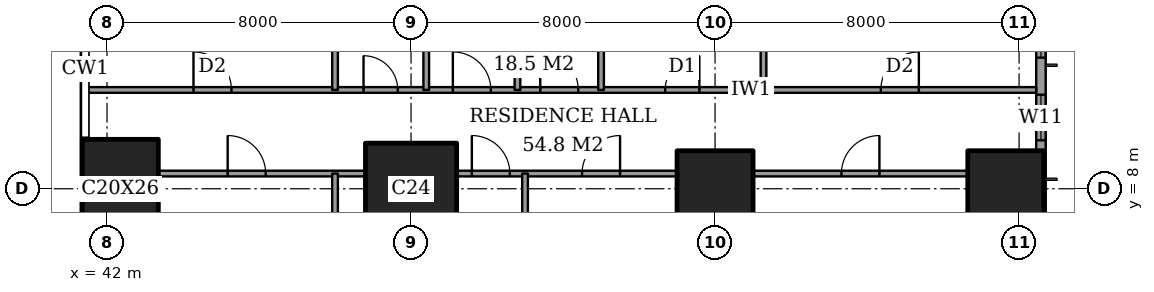
"""IFC4 building model, lengths in metres.
Left out: names, types, materials, properties, quantities, classifications, styles, units other than length and angle.
Written with IfcOpenShell. Run it as: python <this file> out.ifc"""

import sys

from ifc_helpers import new_model, si_unit, direction, frame, frame_2d, origin, origin_2d, place, context, subcontext, project, spatial, rectangle, extrude, element, fill, save


model = new_model("IFC4")
c1 = context("Model", 3, precision=1e-05, world=origin(), true_north=direction((0.0, 1.0)))
c2 = subcontext(c1, "Body", "Model", "MODEL_VIEW")
j1 = project(units=[si_unit("LENGTHUNIT", "METRE"), si_unit("PLANEANGLEUNIT", "RADIAN")], contexts=[c1])
p1 = place(None, origin())
s1 = spatial("IfcSite", under=j1, at=p1, CompositionType="ELEMENT")
p2 = place(p1, origin())
s2 = spatial("IfcBuilding", under=s1, at=p2, CompositionType="ELEMENT")
p3 = place(p2, frame((0.0, 0.0, 143.0)))
s3 = spatial("IfcBuildingStorey", under=s2, at=p3, CompositionType="ELEMENT", Elevation=143.0)
p4 = place(p3, frame((42.35, 8.0, 0.0), z_axis=(0.0, 0.0, 1.0), x_axis=(1.0, 0.0, 0.0)))
e1 = element("IfcColumn", 1, at=p4, inside=s3, PredefinedType="COLUMN", context=c2, shape_type="SweptSolid", body=[
    extrude(rectangle(XDim=2.0, YDim=2.6, at=origin_2d()), origin(), (0.0, 0.0, 1.0), 3.6),
])
p5 = place(p3, frame((50.0, 8.0, 0.0), z_axis=(0.0, 0.0, 1.0), x_axis=(1.0, 0.0, 0.0)))
e2 = element("IfcColumn", 2, at=p5, inside=s3, PredefinedType="COLUMN", context=c2, shape_type="SweptSolid", body=[
    extrude(rectangle(XDim=2.4, YDim=2.4, at=origin_2d()), origin(), (0.0, 0.0, 1.0), 3.6),
])
for number, where, z_axis, x_axis in (
    (3, (58.0, 8.0, 0.0), (0.0, 0.0, 1.0), (1.0, 0.0, 0.0)),
    (4, (65.65, 8.0, 0.0), (0.0, 0.0, 1.0), (1.0, 0.0, 0.0)),
):
    element("IfcColumn", number, at=place(p3, frame(where, z_axis=z_axis, x_axis=x_axis)), inside=s3, PredefinedType="COLUMN", context=c2, shape_type="SweptSolid", body=[
        extrude(rectangle(XDim=2.0, YDim=2.0, at=origin_2d()), origin(), (0.0, 0.0, 1.0), 3.6),
    ])
p6 = place(p3, frame((66.575, 3.175, 0.0), z_axis=(0.0, 0.0, 1.0), x_axis=(0.0, 1.0, 0.0)))
e5 = element("IfcWall", 5, at=p6, inside=s3, PredefinedType="SOLIDWALL", context=c2, shape_type="SweptSolid", body=[
    extrude(rectangle(XDim=41.65, YDim=0.25, at=frame_2d((20.825, 0.0))), origin(), (0.0, 0.0, 1.0), 3.6),
])
p7 = place(p6, frame((0.775, 0.0, 0.4)))
e6 = element("IfcOpeningElement", 6, at=p7, cuts=e5, PredefinedType="OPENING", context=c2, shape_type="SweptSolid", body=[
    extrude(rectangle(XDim=2.4, YDim=2.2, at=frame_2d((1.2, 1.1))), frame((0.0, 0.135, 0.0), z_axis=(0.0, -1.0, 0.0), x_axis=(1.0, 0.0, 0.0)), (0.0, 0.0, 1.0), 0.27),
])
p8 = place(p6, frame((6.1, 0.0, 0.4)))
e7 = element("IfcOpeningElement", 7, at=p8, cuts=e5, PredefinedType="OPENING", context=c2, shape_type="SweptSolid", body=[
    extrude(rectangle(XDim=1.2, YDim=2.2, at=frame_2d((0.6, 1.1))), frame((0.0, 0.135, 0.0), z_axis=(0.0, -1.0, 0.0), x_axis=(1.0, 0.0, 0.0)), (0.0, 0.0, 1.0), 0.27),
])
p9 = place(p6, frame((8.275, 0.0, 0.4)))
e8 = element("IfcOpeningElement", 8, at=p9, cuts=e5, PredefinedType="OPENING", context=c2, shape_type="SweptSolid", body=[
    extrude(rectangle(XDim=2.4, YDim=2.2, at=frame_2d((1.2, 1.1))), frame((0.0, 0.135, 0.0), z_axis=(0.0, -1.0, 0.0), x_axis=(1.0, 0.0, 0.0)), (0.0, 0.0, 1.0), 0.27),
])
p10 = place(p6, frame((15.775, 0.0, 0.4)))
e9 = element("IfcOpeningElement", 9, at=p10, cuts=e5, PredefinedType="OPENING", context=c2, shape_type="SweptSolid", body=[
    extrude(rectangle(XDim=2.4, YDim=2.2, at=frame_2d((1.2, 1.1))), frame((0.0, 0.135, 0.0), z_axis=(0.0, -1.0, 0.0), x_axis=(1.0, 0.0, 0.0)), (0.0, 0.0, 1.0), 0.27),
])
p11 = place(p6, frame((23.475, 0.0, 0.4)))
e10 = element("IfcOpeningElement", 10, at=p11, cuts=e5, PredefinedType="OPENING", context=c2, shape_type="SweptSolid", body=[
    extrude(rectangle(XDim=2.4, YDim=2.2, at=frame_2d((1.2, 1.1))), frame((0.0, 0.135, 0.0), z_axis=(0.0, -1.0, 0.0), x_axis=(1.0, 0.0, 0.0)), (0.0, 0.0, 1.0), 0.27),
])
p12 = place(p6, frame((30.875, 0.0, 0.4)))
e11 = element("IfcOpeningElement", 11, at=p12, cuts=e5, PredefinedType="OPENING", context=c2, shape_type="SweptSolid", body=[
    extrude(rectangle(XDim=2.4, YDim=2.2, at=frame_2d((1.2, 1.1))), frame((0.0, 0.135, 0.0), z_axis=(0.0, -1.0, 0.0), x_axis=(1.0, 0.0, 0.0)), (0.0, 0.0, 1.0), 0.27),
])
p13 = place(p6, frame((34.325, 0.0, 0.4)))
e12 = element("IfcOpeningElement", 12, at=p13, cuts=e5, PredefinedType="OPENING", context=c2, shape_type="SweptSolid", body=[
    extrude(rectangle(XDim=1.2, YDim=2.2, at=frame_2d((0.6, 1.1))), frame((0.0, 0.135, 0.0), z_axis=(0.0, -1.0, 0.0), x_axis=(1.0, 0.0, 0.0)), (0.0, 0.0, 1.0), 0.27),
])
p14 = place(p6, frame((38.475, 0.0, 0.4)))
e13 = element("IfcOpeningElement", 13, at=p14, cuts=e5, PredefinedType="OPENING", context=c2, shape_type="SweptSolid", body=[
    extrude(rectangle(XDim=2.4, YDim=2.2, at=frame_2d((1.2, 1.1))), frame((0.0, 0.135, 0.0), z_axis=(0.0, -1.0, 0.0), x_axis=(1.0, 0.0, 0.0)), (0.0, 0.0, 1.0), 0.27),
])
p15 = place(p3, frame((43.35, 8.4, 0.0), z_axis=(0.0, 0.0, 1.0), x_axis=(1.0, 0.0, 0.0)))
e14 = element("IfcWall", 14, at=p15, inside=s3, PredefinedType="PARTITIONING", context=c2, shape_type="SweptSolid", body=[
    extrude(rectangle(XDim=5.45, YDim=0.15, at=frame_2d((2.725, 0.0))), origin(), (0.0, 0.0, 1.0), 3.35),
])
p16 = place(p15, frame((1.825, 0.0, 0.0)))
e15 = element("IfcOpeningElement", 15, at=p16, cuts=e14, PredefinedType="OPENING", context=c2, shape_type="SweptSolid", body=[
    extrude(rectangle(XDim=1.0, YDim=2.1, at=frame_2d((0.5, 1.05))), frame((0.0, 0.085, 0.0), z_axis=(0.0, -1.0, 0.0), x_axis=(1.0, 0.0, 0.0)), (0.0, 0.0, 1.0), 0.17),
])
p17 = place(p3, frame((51.2, 8.4, 0.0), z_axis=(0.0, 0.0, 1.0), x_axis=(1.0, 0.0, 0.0)))
e16 = element("IfcWall", 16, at=p17, inside=s3, PredefinedType="PARTITIONING", context=c2, shape_type="SweptSolid", body=[
    extrude(rectangle(XDim=5.8, YDim=0.15, at=frame_2d((2.9, 0.0))), origin(), (0.0, 0.0, 1.0), 3.35),
])
p18 = place(p17, frame((3.3, 0.0, 0.0)))
e17 = element("IfcOpeningElement", 17, at=p18, cuts=e16, PredefinedType="OPENING", context=c2, shape_type="SweptSolid", body=[
    extrude(rectangle(XDim=1.0, YDim=2.1, at=frame_2d((0.5, 1.05))), frame((0.0, 0.085, 0.0), z_axis=(0.0, -1.0, 0.0), x_axis=(1.0, 0.0, 0.0)), (0.0, 0.0, 1.0), 0.17),
])
p19 = place(p17, frame((0.4, 0.0, 0.0)))
e18 = element("IfcOpeningElement", 18, at=p19, cuts=e16, PredefinedType="OPENING", context=c2, shape_type="SweptSolid", body=[
    extrude(rectangle(XDim=1.0, YDim=2.1, at=frame_2d((0.5, 1.05))), frame((0.0, 0.085, 0.0), z_axis=(0.0, -1.0, 0.0), x_axis=(1.0, 0.0, 0.0)), (0.0, 0.0, 1.0), 0.17),
])
p20 = place(p3, frame((59.0, 8.4, 0.0), z_axis=(0.0, 0.0, 1.0), x_axis=(1.0, 0.0, 0.0)))
e19 = element("IfcWall", 19, at=p20, inside=s3, PredefinedType="PARTITIONING", context=c2, shape_type="SweptSolid", body=[
    extrude(rectangle(XDim=5.65, YDim=0.15, at=frame_2d((2.825, 0.0))), origin(), (0.0, 0.0, 1.0), 3.35),
])
p21 = place(p20, frame((2.325, 0.0, 0.0)))
e20 = element("IfcOpeningElement", 20, at=p21, cuts=e19, PredefinedType="OPENING", context=c2, shape_type="SweptSolid", body=[
    extrude(rectangle(XDim=1.0, YDim=2.1, at=frame_2d((0.5, 1.05))), frame((0.0, 0.085, 0.0), z_axis=(0.0, -1.0, 0.0), x_axis=(1.0, 0.0, 0.0)), (0.0, 0.0, 1.0), 0.17),
])
p22 = place(p3, frame((41.439, 10.6, 0.0), z_axis=(0.0, 0.0, 1.0), x_axis=(1.0, 0.0, 0.0)))
e21 = element("IfcWall", 21, at=p22, inside=s3, PredefinedType="PARTITIONING", context=c2, shape_type="SweptSolid", body=[
    extrude(rectangle(XDim=25.011, YDim=0.15, at=frame_2d((12.505, 0.0))), origin(), (0.0, 0.0, 1.0), 3.35),
])
p23 = place(p22, frame((11.961, 0.0, 0.0)))
e22 = element("IfcOpeningElement", 22, at=p23, cuts=e21, PredefinedType="OPENING", context=c2, shape_type="SweptSolid", body=[
    extrude(rectangle(XDim=1.0, YDim=2.1, at=frame_2d((0.5, 1.05))), frame((0.0, 0.085, 0.0), z_axis=(0.0, -1.0, 0.0), x_axis=(1.0, 0.0, 0.0)), (0.0, 0.0, 1.0), 0.17),
])
p24 = place(p22, frame((20.924, 0.0, 0.0)))
e23 = element("IfcOpeningElement", 23, at=p24, cuts=e21, PredefinedType="OPENING", context=c2, shape_type="SweptSolid", body=[
    extrude(rectangle(XDim=1.0, YDim=2.1, at=frame_2d((0.5, 1.05))), frame((0.0, 0.085, 0.0), z_axis=(0.0, -1.0, 0.0), x_axis=(1.0, 0.0, 0.0)), (0.0, 0.0, 1.0), 0.17),
])
p25 = place(p22, frame((15.249, 0.0, 0.0)))
e24 = element("IfcOpeningElement", 24, at=p25, cuts=e21, PredefinedType="OPENING", context=c2, shape_type="SweptSolid", body=[
    extrude(rectangle(XDim=0.9, YDim=2.1, at=frame_2d((0.45, 1.05))), frame((0.0, 0.085, 0.0), z_axis=(0.0, -1.0, 0.0), x_axis=(1.0, 0.0, 0.0)), (0.0, 0.0, 1.0), 0.17),
])
p26 = place(p22, frame((9.661, 0.0, 0.0)))
e25 = element("IfcOpeningElement", 25, at=p26, cuts=e21, PredefinedType="OPENING", context=c2, shape_type="SweptSolid", body=[
    extrude(rectangle(XDim=1.0, YDim=2.1, at=frame_2d((0.5, 1.05))), frame((0.0, 0.085, 0.0), z_axis=(0.0, -1.0, 0.0), x_axis=(1.0, 0.0, 0.0)), (0.0, 0.0, 1.0), 0.17),
])
p27 = place(p22, frame((7.311, 0.0, 0.0)))
e26 = element("IfcOpeningElement", 26, at=p27, cuts=e21, PredefinedType="OPENING", context=c2, shape_type="SweptSolid", body=[
    extrude(rectangle(XDim=0.9, YDim=2.1, at=frame_2d((0.45, 1.05))), frame((0.0, 0.085, 0.0), z_axis=(0.0, -1.0, 0.0), x_axis=(1.0, 0.0, 0.0)), (0.0, 0.0, 1.0), 0.17),
])
p28 = place(p22, frame((2.836, 0.0, 0.0)))
e27 = element("IfcOpeningElement", 27, at=p28, cuts=e21, PredefinedType="OPENING", context=c2, shape_type="SweptSolid", body=[
    extrude(rectangle(XDim=1.0, YDim=2.1, at=frame_2d((0.5, 1.05))), frame((0.0, 0.085, 0.0), z_axis=(0.0, -1.0, 0.0), x_axis=(1.0, 0.0, 0.0)), (0.0, 0.0, 1.0), 0.17),
])
p29 = place(p3, frame((48.0, -0.45, 0.0), z_axis=(0.0, 0.0, 1.0), x_axis=(0.0, 1.0, 0.0)))
e28 = element("IfcWall", 28, at=p29, inside=s3, PredefinedType="PARTITIONING", context=c2, shape_type="SweptSolid", body=[
    extrude(rectangle(XDim=8.85, YDim=0.15, at=frame_2d((4.425, 0.0))), origin(), (0.0, 0.0, 1.0), 3.35),
])
p30 = place(p3, frame((48.0, 10.6, 0.0), z_axis=(0.0, 0.0, 1.0), x_axis=(0.0, 1.0, 0.0)))
e29 = element("IfcWall", 29, at=p30, inside=s3, PredefinedType="PARTITIONING", context=c2, shape_type="SweptSolid", body=[
    extrude(rectangle(XDim=8.4, YDim=0.15, at=frame_2d((4.2, 0.0))), origin(), (0.0, 0.0, 1.0), 3.35),
])
p31 = place(p30, frame((6.7, 0.0, 0.0)))
e30 = element("IfcOpeningElement", 30, at=p31, cuts=e29, PredefinedType="OPENING", context=c2, shape_type="SweptSolid", body=[
    extrude(rectangle(XDim=0.9, YDim=2.1, at=frame_2d((0.45, 1.05))), frame((0.0, 0.085, 0.0), z_axis=(0.0, -1.0, 0.0), x_axis=(1.0, 0.0, 0.0)), (0.0, 0.0, 1.0), 0.17),
])
p32 = place(p3, frame((50.4, 10.6, 0.0), z_axis=(0.0, 0.0, 1.0), x_axis=(0.0, 1.0, 0.0)))
e31 = element("IfcWall", 31, at=p32, inside=s3, PredefinedType="PARTITIONING", context=c2, shape_type="SweptSolid", body=[
    extrude(rectangle(XDim=4.2, YDim=0.15, at=frame_2d((2.1, 0.0))), origin(), (0.0, 0.0, 1.0), 3.35),
])
p33 = place(p3, frame((52.8, 10.6, 0.0), z_axis=(0.0, 0.0, 1.0), x_axis=(0.0, 1.0, 0.0)))
e32 = element("IfcWall", 32, at=p33, inside=s3, PredefinedType="PARTITIONING", context=c2, shape_type="SweptSolid", body=[
    extrude(rectangle(XDim=8.4, YDim=0.15, at=frame_2d((4.2, 0.0))), origin(), (0.0, 0.0, 1.0), 3.35),
])
p34 = place(p3, frame((53.0, -0.45, 0.0), z_axis=(0.0, 0.0, 1.0), x_axis=(0.0, 1.0, 0.0)))
e33 = element("IfcWall", 33, at=p34, inside=s3, PredefinedType="PARTITIONING", context=c2, shape_type="SweptSolid", body=[
    extrude(rectangle(XDim=8.85, YDim=0.15, at=frame_2d((4.425, 0.0))), origin(), (0.0, 0.0, 1.0), 3.35),
])
p35 = place(p3, frame((55.0, 10.6, 0.0), z_axis=(0.0, 0.0, 1.0), x_axis=(0.0, 1.0, 0.0)))
e34 = element("IfcWall", 34, at=p35, inside=s3, PredefinedType="PARTITIONING", context=c2, shape_type="SweptSolid", body=[
    extrude(rectangle(XDim=11.0, YDim=0.15, at=frame_2d((5.5, 0.0))), origin(), (0.0, 0.0, 1.0), 3.35),
])
p36 = place(p35, frame((9.2, 0.0, 0.0)))
e35 = element("IfcOpeningElement", 35, at=p36, cuts=e34, PredefinedType="OPENING", context=c2, shape_type="SweptSolid", body=[
    extrude(rectangle(XDim=1.0, YDim=2.1, at=frame_2d((0.5, 1.05))), frame((0.0, 0.085, 0.0), z_axis=(0.0, -1.0, 0.0), x_axis=(1.0, 0.0, 0.0)), (0.0, 0.0, 1.0), 0.17),
])
p37 = place(p3, frame((59.275, 10.6, 0.0), z_axis=(0.0, 0.0, 1.0), x_axis=(0.0, 1.0, 0.0)))
e36 = element("IfcWall", 36, at=p37, inside=s3, PredefinedType="PARTITIONING", context=c2, shape_type="SweptSolid", body=[
    extrude(rectangle(XDim=4.2, YDim=0.15, at=frame_2d((2.1, 0.0))), origin(), (0.0, 0.0, 1.0), 3.35),
])
p38 = place(p8, origin())
e37 = element("IfcWindow", 37, at=p38, inside=s3, PartitioningType="SINGLE_PANEL", PredefinedType="WINDOW", context=c2, shape_type="SweptSolid", body=[
    extrude(rectangle(XDim=1.2, YDim=2.2, at=frame_2d((0.6, 1.1))), frame((0.0, 0.03, 0.0), z_axis=(0.0, -1.0, 0.0), x_axis=(1.0, 0.0, 0.0)), (0.0, 0.0, 1.0), 0.06),
])
fill(e7, e37)
p39 = place(p9, origin())
e38 = element("IfcWindow", 38, at=p39, inside=s3, PartitioningType="SINGLE_PANEL", PredefinedType="WINDOW", context=c2, shape_type="SweptSolid", body=[
    extrude(rectangle(XDim=2.4, YDim=2.2, at=frame_2d((1.2, 1.1))), frame((0.0, 0.03, 0.0), z_axis=(0.0, -1.0, 0.0), x_axis=(1.0, 0.0, 0.0)), (0.0, 0.0, 1.0), 0.06),
])
fill(e8, e38)
p40 = place(p21, origin())
e39 = element("IfcDoor", 39, at=p40, inside=s3, OperationType="SINGLE_SWING_LEFT", PredefinedType="DOOR", context=c2, shape_type="SweptSolid", body=[
    extrude(rectangle(XDim=1.0, YDim=2.1, at=frame_2d((0.5, 1.05))), frame((0.0, 0.025, 0.0), z_axis=(0.0, -1.0, 0.0), x_axis=(1.0, 0.0, 0.0)), (0.0, 0.0, 1.0), 0.05),
])
fill(e20, e39)
p41 = place(p18, origin())
e40 = element("IfcDoor", 40, at=p41, inside=s3, OperationType="SINGLE_SWING_LEFT", PredefinedType="DOOR", context=c2, shape_type="SweptSolid", body=[
    extrude(rectangle(XDim=1.0, YDim=2.1, at=frame_2d((0.5, 1.05))), frame((0.0, 0.025, 0.0), z_axis=(0.0, -1.0, 0.0), x_axis=(1.0, 0.0, 0.0)), (0.0, 0.0, 1.0), 0.05),
])
fill(e17, e40)
p42 = place(p19, origin())
e41 = element("IfcDoor", 41, at=p42, inside=s3, OperationType="SINGLE_SWING_RIGHT", PredefinedType="DOOR", context=c2, shape_type="SweptSolid", body=[
    extrude(rectangle(XDim=1.0, YDim=2.1, at=frame_2d((0.5, 1.05))), frame((0.0, 0.025, 0.0), z_axis=(0.0, -1.0, 0.0), x_axis=(1.0, 0.0, 0.0)), (0.0, 0.0, 1.0), 0.05),
])
fill(e18, e41)
p43 = place(p16, origin())
e42 = element("IfcDoor", 42, at=p43, inside=s3, OperationType="SINGLE_SWING_RIGHT", PredefinedType="DOOR", context=c2, shape_type="SweptSolid", body=[
    extrude(rectangle(XDim=1.0, YDim=2.1, at=frame_2d((0.5, 1.05))), frame((0.0, 0.025, 0.0), z_axis=(0.0, -1.0, 0.0), x_axis=(1.0, 0.0, 0.0)), (0.0, 0.0, 1.0), 0.05),
])
fill(e15, e42)
p44 = place(p23, origin())
e43 = element("IfcDoor", 43, at=p44, inside=s3, OperationType="SINGLE_SWING_RIGHT", PredefinedType="DOOR", context=c2, shape_type="SweptSolid", body=[
    extrude(rectangle(XDim=1.0, YDim=2.1, at=frame_2d((0.5, 1.05))), frame((0.0, 0.025, 0.0), z_axis=(0.0, -1.0, 0.0), x_axis=(1.0, 0.0, 0.0)), (0.0, 0.0, 1.0), 0.05),
])
fill(e22, e43)
p45 = place(p24, origin())
e44 = element("IfcDoor", 44, at=p45, inside=s3, OperationType="SINGLE_SWING_LEFT", PredefinedType="DOOR", context=c2, shape_type="SweptSolid", body=[
    extrude(rectangle(XDim=1.0, YDim=2.1, at=frame_2d((0.5, 1.05))), frame((0.0, 0.025, 0.0), z_axis=(0.0, -1.0, 0.0), x_axis=(1.0, 0.0, 0.0)), (0.0, 0.0, 1.0), 0.05),
])
fill(e23, e44)
p46 = place(p25, origin())
e45 = element("IfcDoor", 45, at=p46, inside=s3, OperationType="SINGLE_SWING_LEFT", PredefinedType="DOOR", context=c2, shape_type="SweptSolid", body=[
    extrude(rectangle(XDim=0.9, YDim=2.1, at=frame_2d((0.45, 1.05))), frame((0.0, 0.025, 0.0), z_axis=(0.0, -1.0, 0.0), x_axis=(1.0, 0.0, 0.0)), (0.0, 0.0, 1.0), 0.05),
])
fill(e24, e45)
p47 = place(p26, origin())
e46 = element("IfcDoor", 46, at=p47, inside=s3, OperationType="SINGLE_SWING_RIGHT", PredefinedType="DOOR", context=c2, shape_type="SweptSolid", body=[
    extrude(rectangle(XDim=1.0, YDim=2.1, at=frame_2d((0.5, 1.05))), frame((0.0, 0.025, 0.0), z_axis=(0.0, -1.0, 0.0), x_axis=(1.0, 0.0, 0.0)), (0.0, 0.0, 1.0), 0.05),
])
fill(e25, e46)
p48 = place(p27, origin())
e47 = element("IfcDoor", 47, at=p48, inside=s3, OperationType="SINGLE_SWING_RIGHT", PredefinedType="DOOR", context=c2, shape_type="SweptSolid", body=[
    extrude(rectangle(XDim=0.9, YDim=2.1, at=frame_2d((0.45, 1.05))), frame((0.0, 0.025, 0.0), z_axis=(0.0, -1.0, 0.0), x_axis=(1.0, 0.0, 0.0)), (0.0, 0.0, 1.0), 0.05),
])
fill(e26, e47)
p49 = place(p28, origin())
e48 = element("IfcDoor", 48, at=p49, inside=s3, OperationType="SINGLE_SWING_RIGHT", PredefinedType="DOOR", context=c2, shape_type="SweptSolid", body=[
    extrude(rectangle(XDim=1.0, YDim=2.1, at=frame_2d((0.5, 1.05))), frame((0.0, 0.025, 0.0), z_axis=(0.0, -1.0, 0.0), x_axis=(1.0, 0.0, 0.0)), (0.0, 0.0, 1.0), 0.05),
])
fill(e27, e48)
save(model, sys.argv[1])
